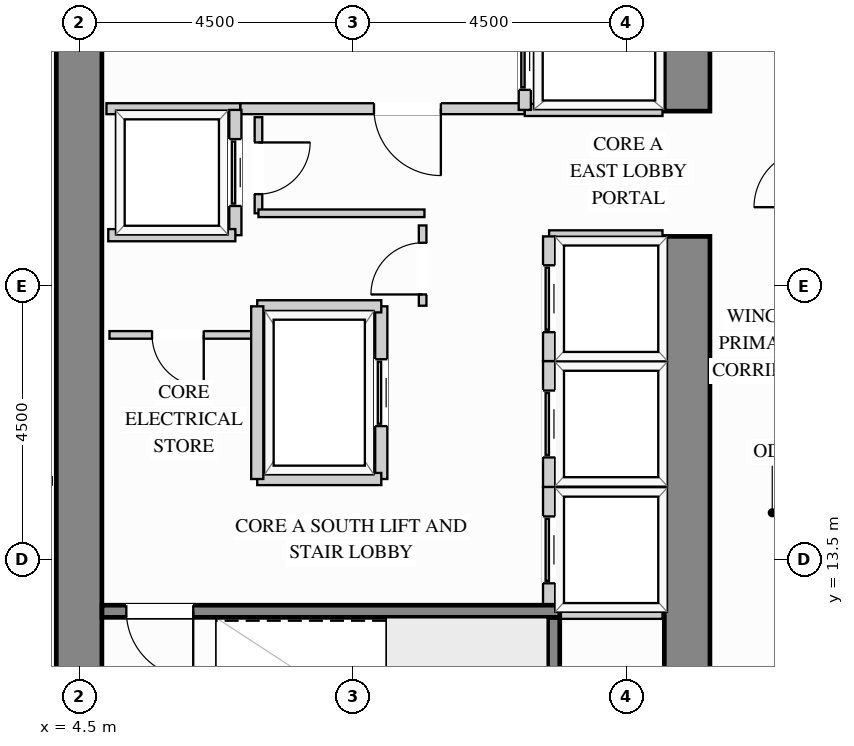
"""IFC4 building model, lengths in metres.
Left out: names, types, materials, properties, quantities, classifications, styles, units other than length and angle.
Written with IfcOpenShell. Run it as: python <this file> out.ifc"""

import sys

from ifc_helpers import new_model, si_unit, direction, frame, frame_2d, origin, place, context, subcontext, project, spatial, rectangle, extrude, source, transform, mapped, element, fill, save


model = new_model("IFC4")
c1 = context("Model", 3, precision=1e-05, world=origin(), true_north=direction((0.0, 1.0)))
c2 = subcontext(c1, "Body", "Model", "MODEL_VIEW")
j1 = project(units=[si_unit("LENGTHUNIT", "METRE"), si_unit("PLANEANGLEUNIT", "RADIAN")], contexts=[c1])
p1 = place(None, origin())
s1 = spatial("IfcSite", under=j1, at=p1, CompositionType="ELEMENT")
p2 = place(p1, origin())
s2 = spatial("IfcBuilding", under=s1, at=p2, CompositionType="ELEMENT")
p3 = place(p2, frame((0.0, 0.0, 77.4)))
s3 = spatial("IfcBuildingStorey", under=s2, at=p3, CompositionType="ELEMENT", Elevation=77.4)
m1 = source(origin(), c2, "Body", "SweptSolid", [
    extrude(rectangle(XDim=9.945, YDim=0.75, at=frame_2d((4.973, 0.0))), origin(), (0.0, 0.0, 1.0), 3.38),
])
p4 = place(p3, frame((14.5, 8.875, 0.0), z_axis=(0.0, 0.0, 1.0), x_axis=(0.0, 1.0, 0.0)))
e1 = element("IfcWall", 1, at=p4, inside=s3, PredefinedType="SHEAR", context=c2, shape_type="MappedRepresentation", body=[
    mapped(m1, transform((0.0, 0.0, 0.0), x_axis=(1.0, 0.0, 0.0), y_axis=(0.0, 1.0, 0.0), z_axis=(0.0, 0.0, 1.0))),
])
m2 = source(origin(), c2, "Body", "SweptSolid", [
    extrude(rectangle(XDim=8.245, YDim=0.75, at=frame_2d((4.123, 0.0))), origin(), (0.0, 0.0, 1.0), 3.38),
])
p5 = place(p3, frame((14.5, 20.88, 0.0), z_axis=(0.0, 0.0, 1.0), x_axis=(0.0, 1.0, 0.0)))
e2 = element("IfcWall", 2, at=p5, inside=s3, PredefinedType="SHEAR", context=c2, shape_type="MappedRepresentation", body=[
    mapped(m2, transform((0.0, 0.0, 0.0), x_axis=(1.0, 0.0, 0.0), y_axis=(0.0, 1.0, 0.0), z_axis=(0.0, 0.0, 1.0))),
])
m3 = source(origin(), c2, "Body", "SweptSolid", [
    extrude(rectangle(XDim=20.25, YDim=0.75, at=frame_2d((10.125, 0.0))), origin(), (0.0, 0.0, 1.0), 3.38),
])
p6 = place(p3, frame((4.5, 8.875, 0.0), z_axis=(0.0, 0.0, 1.0), x_axis=(0.0, 1.0, 0.0)))
e3 = element("IfcWall", 3, at=p6, inside=s3, PredefinedType="SHEAR", context=c2, shape_type="MappedRepresentation", body=[
    mapped(m3, transform((0.0, 0.0, 0.0), x_axis=(1.0, 0.0, 0.0), y_axis=(0.0, 1.0, 0.0), z_axis=(0.0, 0.0, 1.0))),
])
p7 = place(p3, frame((7.15, 20.92, 0.0), z_axis=(0.0, 0.0, 1.0), x_axis=(1.0, 0.0, 0.0)))
e4 = element("IfcWall", 4, at=p7, inside=s3, PredefinedType="PARTITIONING", context=c2, shape_type="SweptSolid", body=[
    extrude(rectangle(XDim=4.68, YDim=0.18, at=frame_2d((2.34, 0.0))), origin(), (0.0, 0.0, 1.0), 3.365),
])
p8 = place(p7, frame((2.2, 0.0, 0.0)))
e5 = element("IfcOpeningElement", 5, at=p8, cuts=e4, PredefinedType="OPENING", context=c2, shape_type="SweptSolid", body=[
    extrude(rectangle(XDim=1.1, YDim=2.15, at=frame_2d((0.55, 1.075))), frame((0.0, 0.1, 0.0), z_axis=(0.0, -1.0, 0.0), x_axis=(1.0, 0.0, 0.0)), (0.0, 0.0, 1.0), 0.2),
])
m4 = source(origin(), c2, "Body", "SweptSolid", [
    extrude(rectangle(XDim=2.2, YDim=0.18, at=frame_2d((1.1, 0.0))), origin(), (0.0, 0.0, 1.0), 3.365),
])
p9 = place(p3, frame((4.95, 20.92, 0.0), z_axis=(0.0, 0.0, 1.0), x_axis=(1.0, 0.0, 0.0)))
e6 = element("IfcWall", 6, at=p9, inside=s3, PredefinedType="PARTITIONING", context=c2, shape_type="MappedRepresentation", body=[
    mapped(m4, transform((0.0, 0.0, 0.0), x_axis=(1.0, 0.0, 0.0), y_axis=(0.0, 1.0, 0.0), z_axis=(0.0, 0.0, 1.0))),
])
p10 = place(p3, frame((10.15, 17.68, 0.0), z_axis=(0.0, 0.0, 1.0), x_axis=(0.0, 1.0, 0.0)))
e7 = element("IfcWall", 7, at=p10, inside=s3, PredefinedType="PARTITIONING", context=c2, shape_type="SweptSolid", body=[
    extrude(rectangle(XDim=1.32, YDim=0.125, at=frame_2d((0.66, 0.0))), origin(), (0.0, 0.0, 1.0), 3.365),
])
p11 = place(p10, frame((0.185, 0.0, 0.0)))
e8 = element("IfcOpeningElement", 8, at=p11, cuts=e7, PredefinedType="OPENING", context=c2, shape_type="SweptSolid", body=[
    extrude(rectangle(XDim=0.85, YDim=2.1, at=frame_2d((0.425, 1.05))), frame((0.0, 0.073, 0.0), z_axis=(0.0, -1.0, 0.0), x_axis=(1.0, 0.0, 0.0)), (0.0, 0.0, 1.0), 0.145),
])
p12 = place(p3, frame((7.45, 19.2, 0.0), z_axis=(0.0, 0.0, 1.0), x_axis=(0.0, 1.0, 0.0)))
e9 = element("IfcWall", 9, at=p12, inside=s3, PredefinedType="PARTITIONING", context=c2, shape_type="SweptSolid", body=[
    extrude(rectangle(XDim=1.58, YDim=0.125, at=frame_2d((0.79, 0.0))), origin(), (0.0, 0.0, 1.0), 3.365),
])
p13 = place(p12, frame((0.315, 0.0, 0.0)))
e10 = element("IfcOpeningElement", 10, at=p13, cuts=e9, PredefinedType="OPENING", context=c2, shape_type="SweptSolid", body=[
    extrude(rectangle(XDim=0.85, YDim=2.1, at=frame_2d((0.425, 1.05))), frame((0.0, 0.073, 0.0), z_axis=(0.0, -1.0, 0.0), x_axis=(1.0, 0.0, 0.0)), (0.0, 0.0, 1.0), 0.145),
])
m5 = source(origin(), c2, "Body", "SweptSolid", [
    extrude(rectangle(XDim=2.73, YDim=0.125, at=frame_2d((1.365, 0.0))), origin(), (0.0, 0.0, 1.0), 3.365),
])
p14 = place(p3, frame((7.45, 19.2, 0.0), z_axis=(0.0, 0.0, 1.0), x_axis=(1.0, 0.0, 0.0)))
e11 = element("IfcWall", 11, at=p14, inside=s3, PredefinedType="PARTITIONING", context=c2, shape_type="MappedRepresentation", body=[
    mapped(m5, transform((0.0, 0.0, 0.0), x_axis=(1.0, 0.0, 0.0), y_axis=(0.0, 1.0, 0.0), z_axis=(0.0, 0.0, 1.0))),
])
p15 = place(p3, frame((5.0, 17.2, 0.0), z_axis=(0.0, 0.0, 1.0), x_axis=(1.0, 0.0, 0.0)))
e12 = element("IfcWall", 12, at=p15, inside=s3, PredefinedType="PARTITIONING", context=c2, shape_type="SweptSolid", body=[
    extrude(rectangle(XDim=2.4, YDim=0.125, at=frame_2d((1.2, 0.0))), origin(), (0.0, 0.0, 1.0), 3.365),
])
p16 = place(p15, frame((0.7, 0.0, 0.0)))
e13 = element("IfcOpeningElement", 13, at=p16, cuts=e12, PredefinedType="OPENING", context=c2, shape_type="SweptSolid", body=[
    extrude(rectangle(XDim=0.85, YDim=2.1, at=frame_2d((0.425, 1.05))), frame((0.0, 0.073, 0.0), z_axis=(0.0, -1.0, 0.0), x_axis=(1.0, 0.0, 0.0)), (0.0, 0.0, 1.0), 0.145),
])
m6 = source(origin(), c2, "Body", "SweptSolid", [
    extrude(rectangle(XDim=3.698, YDim=0.125, at=frame_2d((1.849, 0.0))), origin(), (0.0, 0.0, 1.0), 3.365),
])
p17 = place(p3, frame((0.352, 14.8, 0.0), z_axis=(0.0, 0.0, 1.0), x_axis=(1.0, 0.0, 0.0)))
e14 = element("IfcWall", 14, at=p17, inside=s3, PredefinedType="PARTITIONING", context=c2, shape_type="MappedRepresentation", body=[
    mapped(m6, transform((0.0, 0.0, 0.0), x_axis=(1.0, 0.0, 0.0), y_axis=(0.0, 1.0, 0.0), z_axis=(0.0, 0.0, 1.0))),
])
m7 = source(origin(), c2, "Body", "SweptSolid", [
    extrude(rectangle(XDim=2.265, YDim=0.2, at=frame_2d((1.132, 0.0))), origin(), (0.0, 0.0, 1.0), 3.365),
])
p18 = place(p3, frame((11.83, 20.9, 0.0), z_axis=(0.0, 0.0, 1.0), x_axis=(1.0, 0.0, 0.0)))
e15 = element("IfcWall", 15, at=p18, inside=s3, PredefinedType="PARTITIONING", context=c2, shape_type="MappedRepresentation", body=[
    mapped(m7, transform((0.0, 0.0, 0.0), x_axis=(1.0, 0.0, 0.0), y_axis=(0.0, 1.0, 0.0), z_axis=(0.0, 0.0, 1.0))),
])
p19 = place(p3, frame((11.83, 20.9, 0.0), z_axis=(0.0, 0.0, 1.0), x_axis=(0.0, 1.0, 0.0)))
e16 = element("IfcWall", 16, at=p19, inside=s3, PredefinedType="PARTITIONING", context=c2, shape_type="SweptSolid", body=[
    extrude(rectangle(XDim=1.76, YDim=0.2, at=frame_2d((0.88, 0.0))), origin(), (0.0, 0.0, 1.0), 3.365),
])
p20 = place(p19, frame((0.33, 0.0, 0.0)))
e17 = element("IfcOpeningElement", 17, at=p20, cuts=e16, PredefinedType="OPENING", context=c2, shape_type="SweptSolid", body=[
    extrude(rectangle(XDim=1.1, YDim=2.2, at=frame_2d((0.55, 1.1))), frame((0.0, 0.11, 0.0), z_axis=(0.0, -1.0, 0.0), x_axis=(1.0, 0.0, 0.0)), (0.0, 0.0, 1.0), 0.22),
])
m8 = source(origin(), c2, "Body", "SweptSolid", [
    extrude(rectangle(XDim=1.865, YDim=0.2, at=frame_2d((0.933, 0.0))), origin(), (0.0, 0.0, 1.0), 3.365),
])
for number, where, z_axis, x_axis in (
    (18, (12.23, 14.7, 0.0), (0.0, 0.0, 1.0), (1.0, 0.0, 0.0)),
    (19, (12.23, 12.63, 0.0), (0.0, 0.0, 1.0), (1.0, 0.0, 0.0)),
):
    element("IfcWall", number, at=place(p3, frame(where, z_axis=z_axis, x_axis=x_axis)), inside=s3, PredefinedType="PARTITIONING", context=c2, shape_type="MappedRepresentation", body=[
        mapped(m8, transform((0.0, 0.0, 0.0), x_axis=(1.0, 0.0, 0.0), y_axis=(0.0, 1.0, 0.0), z_axis=(0.0, 0.0, 1.0))),
    ])
p21 = place(p3, frame((12.23, 12.63, 0.0), z_axis=(0.0, 0.0, 1.0), x_axis=(0.0, 1.0, 0.0)))
e20 = element("IfcWall", 20, at=p21, inside=s3, PredefinedType="PARTITIONING", context=c2, shape_type="SweptSolid", body=[
    extrude(rectangle(XDim=2.07, YDim=0.2, at=frame_2d((1.035, 0.0))), origin(), (0.0, 0.0, 1.0), 3.365),
])
p22 = place(p21, frame((0.485, 0.0, 0.0)))
e21 = element("IfcOpeningElement", 21, at=p22, cuts=e20, PredefinedType="OPENING", context=c2, shape_type="SweptSolid", body=[
    extrude(rectangle(XDim=1.1, YDim=2.2, at=frame_2d((0.55, 1.1))), frame((0.0, 0.11, 0.0), z_axis=(0.0, -1.0, 0.0), x_axis=(1.0, 0.0, 0.0)), (0.0, 0.0, 1.0), 0.22),
])
p23 = place(p3, frame((12.23, 16.77, 0.0), z_axis=(0.0, 0.0, 1.0), x_axis=(1.0, 0.0, 0.0)))
e22 = element("IfcWall", 22, at=p23, inside=s3, PredefinedType="PARTITIONING", context=c2, shape_type="MappedRepresentation", body=[
    mapped(m8, transform((0.0, 0.0, 0.0), x_axis=(1.0, 0.0, 0.0), y_axis=(0.0, 1.0, 0.0), z_axis=(0.0, 0.0, 1.0))),
])
p24 = place(p3, frame((12.23, 14.7, 0.0), z_axis=(0.0, 0.0, 1.0), x_axis=(0.0, 1.0, 0.0)))
e23 = element("IfcWall", 23, at=p24, inside=s3, PredefinedType="PARTITIONING", context=c2, shape_type="SweptSolid", body=[
    extrude(rectangle(XDim=2.07, YDim=0.2, at=frame_2d((1.035, 0.0))), origin(), (0.0, 0.0, 1.0), 3.365),
])
p25 = place(p24, frame((0.485, 0.0, 0.0)))
e24 = element("IfcOpeningElement", 24, at=p25, cuts=e23, PredefinedType="OPENING", context=c2, shape_type="SweptSolid", body=[
    extrude(rectangle(XDim=1.1, YDim=2.2, at=frame_2d((0.55, 1.1))), frame((0.0, 0.11, 0.0), z_axis=(0.0, -1.0, 0.0), x_axis=(1.0, 0.0, 0.0)), (0.0, 0.0, 1.0), 0.22),
])
p26 = place(p3, frame((12.23, 18.82, 0.0), z_axis=(0.0, 0.0, 1.0), x_axis=(1.0, 0.0, 0.0)))
e25 = element("IfcWall", 25, at=p26, inside=s3, PredefinedType="PARTITIONING", context=c2, shape_type="MappedRepresentation", body=[
    mapped(m8, transform((0.0, 0.0, 0.0), x_axis=(1.0, 0.0, 0.0), y_axis=(0.0, 1.0, 0.0), z_axis=(0.0, 0.0, 1.0))),
])
p27 = place(p3, frame((12.23, 16.77, 0.0), z_axis=(0.0, 0.0, 1.0), x_axis=(0.0, 1.0, 0.0)))
e26 = element("IfcWall", 26, at=p27, inside=s3, PredefinedType="PARTITIONING", context=c2, shape_type="SweptSolid", body=[
    extrude(rectangle(XDim=2.05, YDim=0.2, at=frame_2d((1.025, 0.0))), origin(), (0.0, 0.0, 1.0), 3.365),
])
p28 = place(p27, frame((0.475, 0.0, 0.0)))
e27 = element("IfcOpeningElement", 27, at=p28, cuts=e26, PredefinedType="OPENING", context=c2, shape_type="SweptSolid", body=[
    extrude(rectangle(XDim=1.1, YDim=2.2, at=frame_2d((0.55, 1.1))), frame((0.0, 0.11, 0.0), z_axis=(0.0, -1.0, 0.0), x_axis=(1.0, 0.0, 0.0)), (0.0, 0.0, 1.0), 0.22),
])
p29 = place(p3, frame((7.07, 18.84, 0.0), z_axis=(0.0, 0.0, 1.0), x_axis=(0.0, 1.0, 0.0)))
e28 = element("IfcWall", 28, at=p29, inside=s3, PredefinedType="PARTITIONING", context=c2, shape_type="SweptSolid", body=[
    extrude(rectangle(XDim=2.06, YDim=0.2, at=frame_2d((1.03, 0.0))), origin(), (0.0, 0.0, 1.0), 3.365),
])
p30 = place(p29, frame((0.48, 0.0, 0.0)))
e29 = element("IfcOpeningElement", 29, at=p30, cuts=e28, PredefinedType="OPENING", context=c2, shape_type="SweptSolid", body=[
    extrude(rectangle(XDim=1.1, YDim=2.2, at=frame_2d((0.55, 1.1))), frame((0.0, 0.11, 0.0), z_axis=(0.0, -1.0, 0.0), x_axis=(1.0, 0.0, 0.0)), (0.0, 0.0, 1.0), 0.22),
])
m9 = source(origin(), c2, "Body", "SweptSolid", [
    extrude(rectangle(XDim=2.09, YDim=0.2, at=frame_2d((1.045, 0.0))), origin(), (0.0, 0.0, 1.0), 3.365),
])
p31 = place(p3, frame((4.98, 18.84, 0.0), z_axis=(0.0, 0.0, 1.0), x_axis=(1.0, 0.0, 0.0)))
e30 = element("IfcWall", 30, at=p31, inside=s3, PredefinedType="PARTITIONING", context=c2, shape_type="MappedRepresentation", body=[
    mapped(m9, transform((0.0, 0.0, 0.0), x_axis=(1.0, 0.0, 0.0), y_axis=(0.0, 1.0, 0.0), z_axis=(0.0, 0.0, 1.0))),
])
p32 = place(p3, frame((9.47, 14.83, 0.0), z_axis=(0.0, 0.0, 1.0), x_axis=(0.0, 1.0, 0.0)))
e31 = element("IfcWall", 31, at=p32, inside=s3, PredefinedType="PARTITIONING", context=c2, shape_type="SweptSolid", body=[
    extrude(rectangle(XDim=2.84, YDim=0.2, at=frame_2d((1.42, 0.0))), origin(), (0.0, 0.0, 1.0), 3.365),
])
p33 = place(p32, frame((0.87, 0.0, 0.0)))
e32 = element("IfcOpeningElement", 32, at=p33, cuts=e31, PredefinedType="OPENING", context=c2, shape_type="SweptSolid", body=[
    extrude(rectangle(XDim=1.1, YDim=2.2, at=frame_2d((0.55, 1.1))), frame((0.0, 0.11, 0.0), z_axis=(0.0, -1.0, 0.0), x_axis=(1.0, 0.0, 0.0)), (0.0, 0.0, 1.0), 0.22),
])
m10 = source(origin(), c2, "Body", "SweptSolid", [
    extrude(rectangle(XDim=2.04, YDim=0.2, at=frame_2d((1.02, 0.0))), origin(), (0.0, 0.0, 1.0), 3.365),
])
for number, where, z_axis, x_axis in (
    (33, (7.43, 17.67, 0.0), (0.0, 0.0, 1.0), (1.0, 0.0, 0.0)),
    (34, (7.43, 14.83, 0.0), (0.0, 0.0, 1.0), (1.0, 0.0, 0.0)),
):
    element("IfcWall", number, at=place(p3, frame(where, z_axis=z_axis, x_axis=x_axis)), inside=s3, PredefinedType="PARTITIONING", context=c2, shape_type="MappedRepresentation", body=[
        mapped(m10, transform((0.0, 0.0, 0.0), x_axis=(1.0, 0.0, 0.0), y_axis=(0.0, 1.0, 0.0), z_axis=(0.0, 0.0, 1.0))),
    ])
m11 = source(origin(), c2, "Body", "SweptSolid", [
    extrude(rectangle(XDim=2.84, YDim=0.2, at=frame_2d((1.42, 0.0))), origin(), (0.0, 0.0, 1.0), 3.365),
])
p34 = place(p3, frame((7.43, 14.83, 0.0), z_axis=(0.0, 0.0, 1.0), x_axis=(0.0, 1.0, 0.0)))
e35 = element("IfcWall", 35, at=p34, inside=s3, PredefinedType="PARTITIONING", context=c2, shape_type="MappedRepresentation", body=[
    mapped(m11, transform((0.0, 0.0, 0.0), x_axis=(1.0, 0.0, 0.0), y_axis=(0.0, 1.0, 0.0), z_axis=(0.0, 0.0, 1.0))),
])
m12 = source(origin(), c2, "Body", "SweptSolid", [
    extrude(rectangle(XDim=3.678, YDim=0.2, at=frame_2d((1.839, 0.0))), origin(), (0.0, 0.0, 1.0), 3.38),
])
p35 = place(p3, frame((12.305, 8.877, 0.0), z_axis=(0.0, 0.0, 1.0), x_axis=(0.0, 1.0, 0.0)))
e36 = element("IfcWall", 36, at=p35, inside=s3, PredefinedType="SHEAR", context=c2, shape_type="MappedRepresentation", body=[
    mapped(m12, transform((0.0, 0.0, 0.0), x_axis=(1.0, 0.0, 0.0), y_axis=(0.0, 1.0, 0.0), z_axis=(0.0, 0.0, 1.0))),
])
p36 = place(p3, frame((4.877, 12.655, 0.0), z_axis=(0.0, 0.0, 1.0), x_axis=(1.0, 0.0, 0.0)))
e37 = element("IfcWall", 37, at=p36, inside=s3, PredefinedType="SHEAR", context=c2, shape_type="SweptSolid", body=[
    extrude(rectangle(XDim=7.528, YDim=0.2, at=frame_2d((3.764, 0.0))), origin(), (0.0, 0.0, 1.0), 3.38),
])
p37 = place(p36, frame((0.4, 0.0, 0.0)))
e38 = element("IfcOpeningElement", 38, at=p37, cuts=e37, PredefinedType="OPENING", context=c2, shape_type="SweptSolid", body=[
    extrude(rectangle(XDim=1.1, YDim=2.15, at=frame_2d((0.55, 1.075))), frame((0.0, 0.11, 0.0), z_axis=(0.0, -1.0, 0.0), x_axis=(1.0, 0.0, 0.0)), (0.0, 0.0, 1.0), 0.22),
])
m13 = source(origin(), c2, "Body", "SweptSolid", [
    extrude(rectangle(XDim=1.1, YDim=2.15, at=frame_2d((0.55, 1.075))), frame((0.0, 0.025, 0.0), z_axis=(0.0, -1.0, 0.0), x_axis=(1.0, 0.0, 0.0)), (0.0, 0.0, 1.0), 0.05),
])
p38 = place(p8, origin())
e39 = element("IfcDoor", 39, at=p38, inside=s3, OperationType="SINGLE_SWING_RIGHT", PredefinedType="DOOR", context=c2, shape_type="MappedRepresentation", body=[
    mapped(m13, transform((0.0, 0.0, 0.0), x_axis=(1.0, 0.0, 0.0), y_axis=(0.0, 1.0, 0.0), z_axis=(0.0, 0.0, 1.0))),
])
fill(e5, e39)
m14 = source(origin(), c2, "Body", "SweptSolid", [
    extrude(rectangle(XDim=1.1, YDim=2.2, at=frame_2d((0.55, 1.1))), frame((0.0, 0.025, 0.0), z_axis=(0.0, -1.0, 0.0), x_axis=(1.0, 0.0, 0.0)), (0.0, 0.0, 1.0), 0.05),
])
p39 = place(p20, origin())
e40 = element("IfcDoor", 40, at=p39, inside=s3, OperationType="SLIDING_TO_LEFT", PredefinedType="DOOR", context=c2, shape_type="MappedRepresentation", body=[
    mapped(m14, transform((0.0, 0.0, 0.0), x_axis=(1.0, 0.0, 0.0), y_axis=(0.0, 1.0, 0.0), z_axis=(0.0, 0.0, 1.0))),
])
fill(e17, e40)
p40 = place(p22, origin())
e41 = element("IfcDoor", 41, at=p40, inside=s3, OperationType="SLIDING_TO_LEFT", PredefinedType="DOOR", context=c2, shape_type="MappedRepresentation", body=[
    mapped(m14, transform((0.0, 0.0, 0.0), x_axis=(1.0, 0.0, 0.0), y_axis=(0.0, 1.0, 0.0), z_axis=(0.0, 0.0, 1.0))),
])
fill(e21, e41)
p41 = place(p25, origin())
e42 = element("IfcDoor", 42, at=p41, inside=s3, OperationType="SLIDING_TO_LEFT", PredefinedType="DOOR", context=c2, shape_type="MappedRepresentation", body=[
    mapped(m14, transform((0.0, 0.0, 0.0), x_axis=(1.0, 0.0, 0.0), y_axis=(0.0, 1.0, 0.0), z_axis=(0.0, 0.0, 1.0))),
])
fill(e24, e42)
p42 = place(p28, origin())
e43 = element("IfcDoor", 43, at=p42, inside=s3, OperationType="SLIDING_TO_LEFT", PredefinedType="DOOR", context=c2, shape_type="MappedRepresentation", body=[
    mapped(m14, transform((0.0, 0.0, 0.0), x_axis=(1.0, 0.0, 0.0), y_axis=(0.0, 1.0, 0.0), z_axis=(0.0, 0.0, 1.0))),
])
fill(e27, e43)
p43 = place(p30, origin())
e44 = element("IfcDoor", 44, at=p43, inside=s3, OperationType="SLIDING_TO_LEFT", PredefinedType="DOOR", context=c2, shape_type="MappedRepresentation", body=[
    mapped(m14, transform((0.0, 0.0, 0.0), x_axis=(1.0, 0.0, 0.0), y_axis=(0.0, 1.0, 0.0), z_axis=(0.0, 0.0, 1.0))),
])
fill(e29, e44)
p44 = place(p33, origin())
e45 = element("IfcDoor", 45, at=p44, inside=s3, OperationType="SLIDING_TO_LEFT", PredefinedType="DOOR", context=c2, shape_type="MappedRepresentation", body=[
    mapped(m14, transform((0.0, 0.0, 0.0), x_axis=(1.0, 0.0, 0.0), y_axis=(0.0, 1.0, 0.0), z_axis=(0.0, 0.0, 1.0))),
])
fill(e32, e45)
m15 = source(origin(), c2, "Body", "SweptSolid", [
    extrude(rectangle(XDim=0.85, YDim=2.1, at=frame_2d((0.425, 1.05))), frame((0.0, 0.025, 0.0), z_axis=(0.0, -1.0, 0.0), x_axis=(1.0, 0.0, 0.0)), (0.0, 0.0, 1.0), 0.05),
])
p45 = place(p11, origin())
e46 = element("IfcDoor", 46, at=p45, inside=s3, OperationType="SINGLE_SWING_LEFT", PredefinedType="DOOR", context=c2, shape_type="MappedRepresentation", body=[
    mapped(m15, transform((0.0, 0.0, 0.0), x_axis=(1.0, 0.0, 0.0), y_axis=(0.0, 1.0, 0.0), z_axis=(0.0, 0.0, 1.0))),
])
fill(e8, e46)
p46 = place(p16, origin())
e47 = element("IfcDoor", 47, at=p46, inside=s3, OperationType="SINGLE_SWING_RIGHT", PredefinedType="DOOR", context=c2, shape_type="MappedRepresentation", body=[
    mapped(m15, transform((0.0, 0.0, 0.0), x_axis=(1.0, 0.0, 0.0), y_axis=(0.0, 1.0, 0.0), z_axis=(0.0, 0.0, 1.0))),
])
fill(e13, e47)
p47 = place(p13, origin())
e48 = element("IfcDoor", 48, at=p47, inside=s3, OperationType="SINGLE_SWING_RIGHT", PredefinedType="DOOR", context=c2, shape_type="MappedRepresentation", body=[
    mapped(m15, transform((0.0, 0.0, 0.0), x_axis=(1.0, 0.0, 0.0), y_axis=(0.0, 1.0, 0.0), z_axis=(0.0, 0.0, 1.0))),
])
fill(e10, e48)
m16 = source(origin(), c2, "Body", "SweptSolid", [
    extrude(rectangle(XDim=1.1, YDim=2.15, at=frame_2d((0.55, 1.075))), frame((0.0, 0.025, 0.0), z_axis=(0.0, -1.0, 0.0), x_axis=(1.0, 0.0, 0.0)), (0.0, 0.0, 1.0), 0.05),
])
p48 = place(p37, origin())
e49 = element("IfcDoor", 49, at=p48, inside=s3, OperationType="SINGLE_SWING_RIGHT", PredefinedType="DOOR", context=c2, shape_type="MappedRepresentation", body=[
    mapped(m16, transform((0.0, 0.0, 0.0), x_axis=(1.0, 0.0, 0.0), y_axis=(0.0, 1.0, 0.0), z_axis=(0.0, 0.0, 1.0))),
])
fill(e38, e49)
save(model, sys.argv[1])
